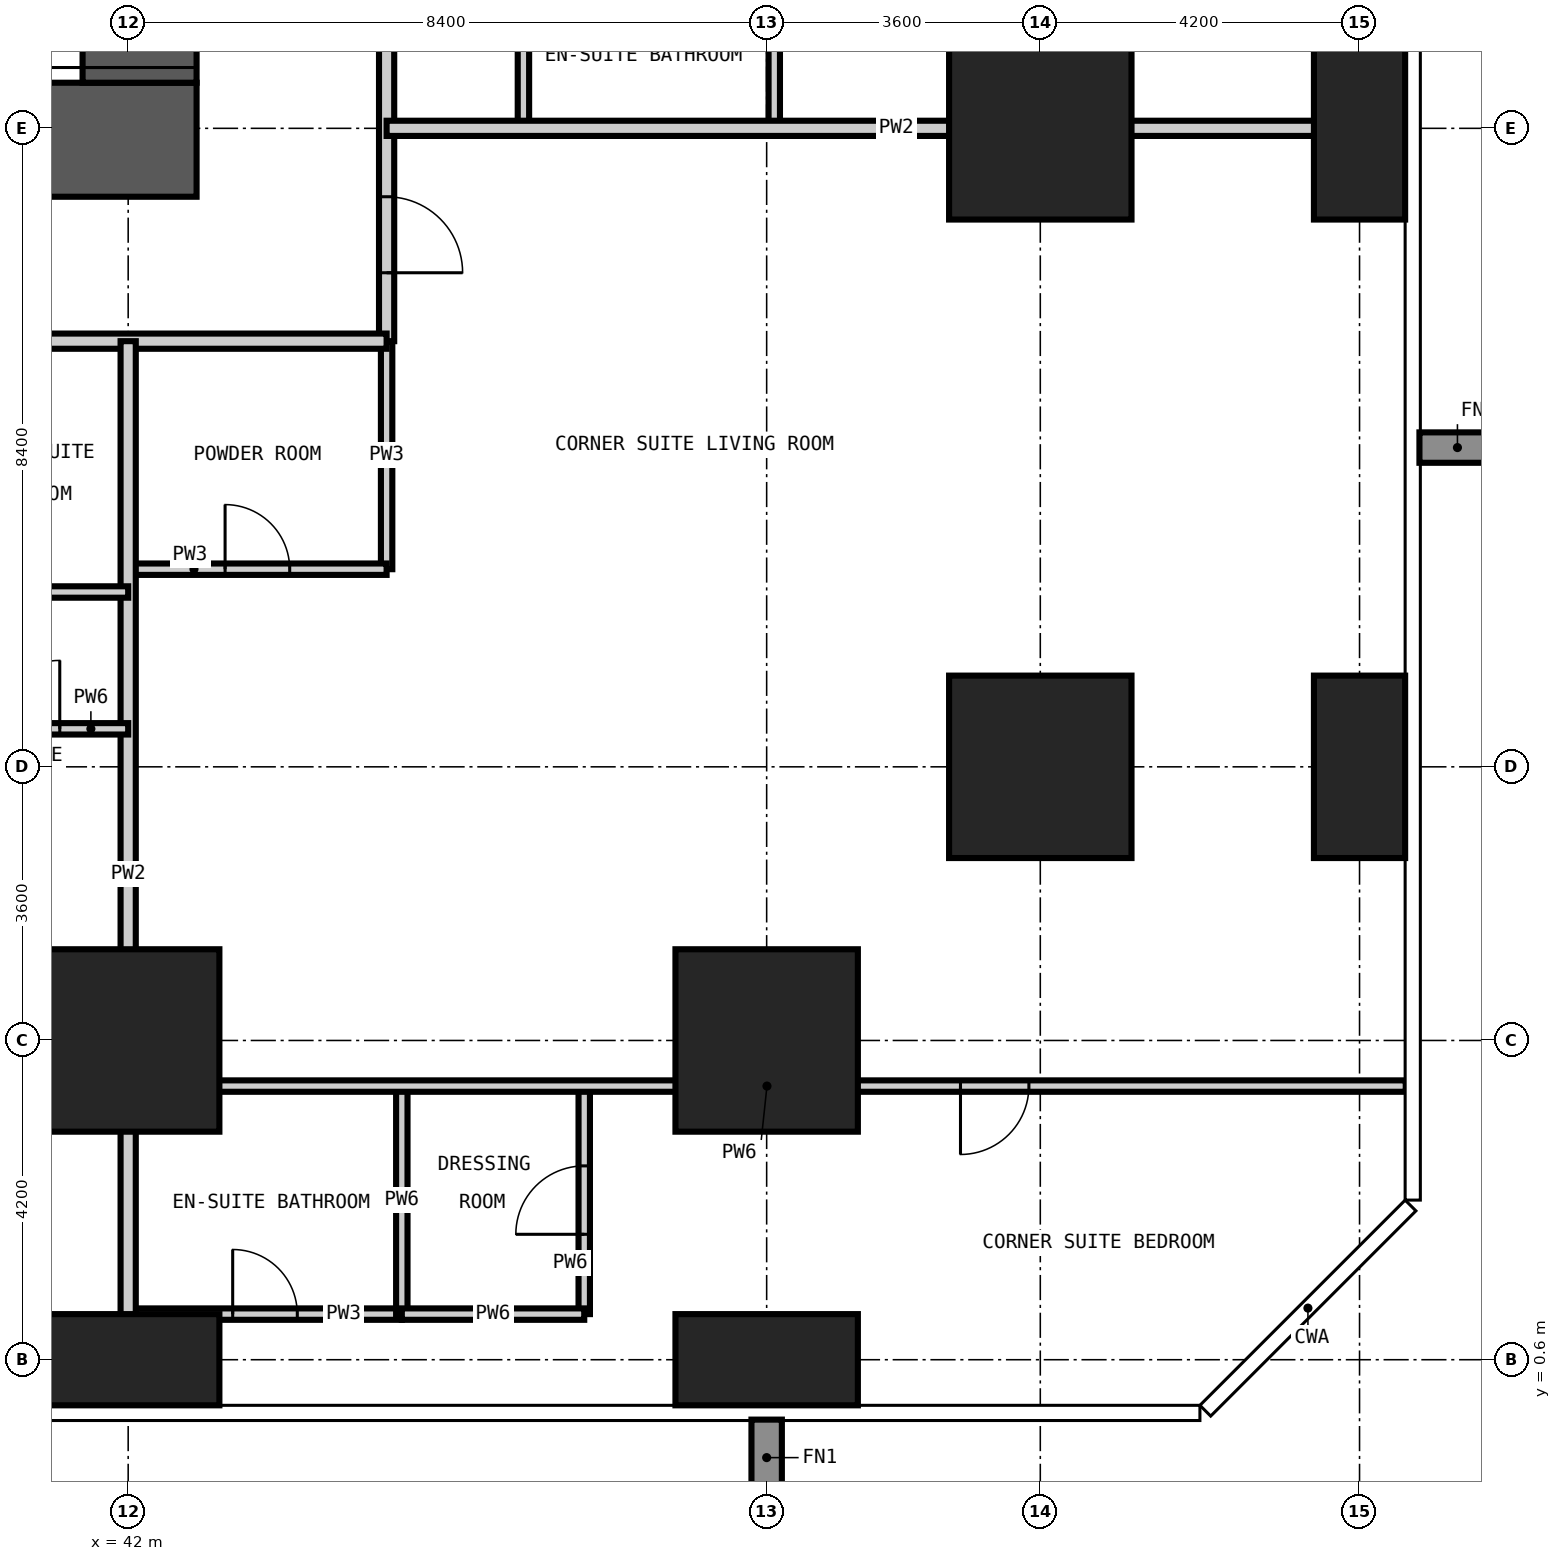
"""IFC4 building model, lengths in metres.
Left out: names, types, materials, properties, quantities, classifications, styles, units other than length and angle.
Written with IfcOpenShell. Run it as: python <this file> out.ifc"""

import sys

from ifc_helpers import new_model, si_unit, direction, frame, frame_2d, origin, origin_2d, place, context, subcontext, project, spatial, rectangle, extrude, element, fill, save


model = new_model("IFC4")
c1 = context("Model", 3, precision=1e-05, world=origin(), true_north=direction((0.0, 1.0)))
c2 = subcontext(c1, "Body", "Model", "MODEL_VIEW")
j1 = project(units=[si_unit("LENGTHUNIT", "METRE"), si_unit("PLANEANGLEUNIT", "RADIAN")], contexts=[c1])
p1 = place(None, origin())
s1 = spatial("IfcSite", under=j1, at=p1, CompositionType="ELEMENT")
p2 = place(p1, origin())
s2 = spatial("IfcBuilding", under=s1, at=p2, CompositionType="ELEMENT")
p3 = place(p2, frame((0.0, 0.0, 81.0)))
s3 = spatial("IfcBuildingStorey", under=s2, at=p3, CompositionType="ELEMENT", Elevation=81.0)
p4 = place(p3, frame((42.0, 0.6, -0.35), z_axis=(0.0, 0.0, 1.0), x_axis=(1.0, 0.0, 0.0)))
e1 = element("IfcColumn", 1, at=p4, inside=s3, PredefinedType="COLUMN", context=c2, shape_type="SweptSolid", body=[
    extrude(rectangle(XDim=2.4, YDim=1.2, at=origin_2d()), origin(), (0.0, 0.0, 1.0), 3.6),
])
p5 = place(p3, frame((42.0, 4.8, -0.35), z_axis=(0.0, 0.0, 1.0), x_axis=(1.0, 0.0, 0.0)))
e2 = element("IfcColumn", 2, at=p5, inside=s3, PredefinedType="COLUMN", context=c2, shape_type="SweptSolid", body=[
    extrude(rectangle(XDim=2.4, YDim=2.4, at=origin_2d()), origin(), (0.0, 0.0, 1.0), 3.6),
])
p6 = place(p3, frame((50.4, 0.6, -0.35), z_axis=(0.0, 0.0, 1.0), x_axis=(1.0, 0.0, 0.0)))
e3 = element("IfcColumn", 3, at=p6, inside=s3, PredefinedType="COLUMN", context=c2, shape_type="SweptSolid", body=[
    extrude(rectangle(XDim=2.4, YDim=1.2, at=origin_2d()), origin(), (0.0, 0.0, 1.0), 3.6),
])
for number, where, z_axis, x_axis in (
    (4, (50.4, 4.8, -0.35), (0.0, 0.0, 1.0), (1.0, 0.0, 0.0)),
    (5, (54.0, 8.4, -0.35), (0.0, 0.0, 1.0), (1.0, 0.0, 0.0)),
    (6, (54.0, 16.8, -0.35), (0.0, 0.0, 1.0), (1.0, 0.0, 0.0)),
):
    element("IfcColumn", number, at=place(p3, frame(where, z_axis=z_axis, x_axis=x_axis)), inside=s3, PredefinedType="COLUMN", context=c2, shape_type="SweptSolid", body=[
        extrude(rectangle(XDim=2.4, YDim=2.4, at=origin_2d()), origin(), (0.0, 0.0, 1.0), 3.6),
    ])
for number, where, z_axis, x_axis in (
    (7, (58.2, 8.4, -0.35), (0.0, 0.0, 1.0), (1.0, 0.0, 0.0)),
    (8, (58.2, 16.8, -0.35), (0.0, 0.0, 1.0), (1.0, 0.0, 0.0)),
):
    element("IfcColumn", number, at=place(p3, frame(where, z_axis=z_axis, x_axis=x_axis)), inside=s3, PredefinedType="COLUMN", context=c2, shape_type="SweptSolid", body=[
        extrude(rectangle(XDim=1.2, YDim=2.4, at=origin_2d()), origin(), (0.0, 0.0, 1.0), 3.6),
    ])
p7 = place(p3, frame((15.9, 16.65, -0.35), z_axis=(0.0, 0.0, 1.0), x_axis=(1.0, 0.0, 0.0)))
e9 = element("IfcWall", 9, at=p7, inside=s3, PredefinedType="SHEAR", context=c2, shape_type="SweptSolid", body=[
    extrude(rectangle(XDim=27.0, YDim=1.5, at=frame_2d((13.5, 0.0))), origin(), (0.0, 0.0, 1.0), 3.6),
])
p8 = place(p7, frame((13.0, 0.0, 0.35)))
e10 = element("IfcOpeningElement", 10, at=p8, cuts=e9, PredefinedType="OPENING", context=c2, shape_type="SweptSolid", body=[
    extrude(rectangle(XDim=1.0, YDim=2.1, at=frame_2d((0.5, 1.05))), frame((0.0, 0.76, 0.0), z_axis=(0.0, -1.0, 0.0), x_axis=(1.0, 0.0, 0.0)), (0.0, 0.0, 1.0), 1.52),
])
p9 = place(p7, frame((19.3, 0.0, 0.35)))
e11 = element("IfcOpeningElement", 11, at=p9, cuts=e9, PredefinedType="OPENING", context=c2, shape_type="SweptSolid", body=[
    extrude(rectangle(XDim=1.0, YDim=2.1, at=frame_2d((0.5, 1.05))), frame((0.0, 0.76, 0.0), z_axis=(0.0, -1.0, 0.0), x_axis=(1.0, 0.0, 0.0)), (0.0, 0.0, 1.0), 1.52),
])
p10 = place(p3, frame((42.15, 17.4, -0.35), z_axis=(0.0, 0.0, 1.0), x_axis=(0.0, 1.0, 0.0)))
e12 = element("IfcWall", 12, at=p10, inside=s3, PredefinedType="SHEAR", context=c2, shape_type="SweptSolid", body=[
    extrude(rectangle(XDim=24.0, YDim=1.5, at=frame_2d((12.0, 0.0))), origin(), (0.0, 0.0, 1.0), 3.6),
])
p11 = place(p10, frame((0.2, 0.0, 0.35)))
e13 = element("IfcOpeningElement", 13, at=p11, cuts=e12, PredefinedType="OPENING", context=c2, shape_type="SweptSolid", body=[
    extrude(rectangle(XDim=1.2, YDim=2.2, at=frame_2d((0.6, 1.1))), frame((0.0, 0.76, 0.0), z_axis=(0.0, -1.0, 0.0), x_axis=(1.0, 0.0, 0.0)), (0.0, 0.0, 1.0), 1.52),
])
p12 = place(p10, frame((11.5, 0.0, 0.35)))
e14 = element("IfcOpeningElement", 14, at=p12, cuts=e12, PredefinedType="OPENING", context=c2, shape_type="SweptSolid", body=[
    extrude(rectangle(XDim=1.0, YDim=2.1, at=frame_2d((0.5, 1.05))), frame((0.0, 0.76, 0.0), z_axis=(0.0, -1.0, 0.0), x_axis=(1.0, 0.0, 0.0)), (0.0, 0.0, 1.0), 1.52),
])
p13 = place(p10, frame((19.9, 0.0, 0.35)))
e15 = element("IfcOpeningElement", 15, at=p13, cuts=e12, PredefinedType="OPENING", context=c2, shape_type="SweptSolid", body=[
    extrude(rectangle(XDim=1.0, YDim=2.1, at=frame_2d((0.5, 1.05))), frame((0.0, 0.76, 0.0), z_axis=(0.0, -1.0, 0.0), x_axis=(1.0, 0.0, 0.0)), (0.0, 0.0, 1.0), 1.52),
])
for number, where, z_axis, x_axis in (
    (16, (45.4, 11.0, 0.0), (0.0, 0.0, 1.0), (0.0, 1.0, 0.0)),
    (17, (47.2, 16.8, 0.0), (0.0, 0.0, 1.0), (0.0, 1.0, 0.0)),
    (18, (50.5, 16.8, 0.0), (0.0, 0.0, 1.0), (0.0, 1.0, 0.0)),
):
    element("IfcWall", number, at=place(p3, frame(where, z_axis=z_axis, x_axis=x_axis)), inside=s3, PredefinedType="PARTITIONING", context=c2, shape_type="SweptSolid", body=[
        extrude(rectangle(XDim=3.0, YDim=0.15, at=frame_2d((1.5, 0.0))), origin(), (0.0, 0.0, 1.0), 3.25),
    ])
p14 = place(p3, frame((42.0, 1.2, 0.0), z_axis=(0.0, 0.0, 1.0), x_axis=(1.0, 0.0, 0.0)))
e19 = element("IfcWall", 19, at=p14, inside=s3, PredefinedType="PARTITIONING", context=c2, shape_type="SweptSolid", body=[
    extrude(rectangle(XDim=3.6, YDim=0.15, at=frame_2d((1.8, 0.0))), origin(), (0.0, 0.0, 1.0), 3.25),
])
p15 = place(p14, frame((1.375, 0.0, 0.0)))
e20 = element("IfcOpeningElement", 20, at=p15, cuts=e19, PredefinedType="OPENING", context=c2, shape_type="SweptSolid", body=[
    extrude(rectangle(XDim=0.85, YDim=2.1, at=frame_2d((0.425, 1.05))), frame((0.0, 0.085, 0.0), z_axis=(0.0, -1.0, 0.0), x_axis=(1.0, 0.0, 0.0)), (0.0, 0.0, 1.0), 0.17),
])
p16 = place(p3, frame((42.0, 11.0, 0.0), z_axis=(0.0, 0.0, 1.0), x_axis=(1.0, 0.0, 0.0)))
e21 = element("IfcWall", 21, at=p16, inside=s3, PredefinedType="PARTITIONING", context=c2, shape_type="SweptSolid", body=[
    extrude(rectangle(XDim=3.4, YDim=0.15, at=frame_2d((1.7, 0.0))), origin(), (0.0, 0.0, 1.0), 3.25),
])
p17 = place(p16, frame((1.275, 0.0, 0.0)))
e22 = element("IfcOpeningElement", 22, at=p17, cuts=e21, PredefinedType="OPENING", context=c2, shape_type="SweptSolid", body=[
    extrude(rectangle(XDim=0.85, YDim=2.1, at=frame_2d((0.425, 1.05))), frame((0.0, 0.085, 0.0), z_axis=(0.0, -1.0, 0.0), x_axis=(1.0, 0.0, 0.0)), (0.0, 0.0, 1.0), 0.17),
])
p18 = place(p3, frame((45.4, 46.0, 0.0), z_axis=(0.0, 0.0, 1.0), x_axis=(0.0, -1.0, 0.0)))
e23 = element("IfcWall", 23, at=p18, inside=s3, PredefinedType="PARTITIONING", context=c2, shape_type="SweptSolid", body=[
    extrude(rectangle(XDim=32.0, YDim=0.2, at=frame_2d((16.0, 0.0))), origin(), (0.0, 0.0, 1.0), 3.25),
])
p19 = place(p18, frame((22.4, 0.0, 0.0)))
e24 = element("IfcOpeningElement", 24, at=p19, cuts=e23, PredefinedType="OPENING", context=c2, shape_type="SweptSolid", body=[
    extrude(rectangle(XDim=1.0, YDim=2.2, at=frame_2d((0.5, 1.1))), frame((0.0, 0.11, 0.0), z_axis=(0.0, -1.0, 0.0), x_axis=(1.0, 0.0, 0.0)), (0.0, 0.0, 1.0), 0.22),
])
p20 = place(p18, frame((9.8, 0.0, 0.0)))
e25 = element("IfcOpeningElement", 25, at=p20, cuts=e23, PredefinedType="OPENING", context=c2, shape_type="SweptSolid", body=[
    extrude(rectangle(XDim=1.0, YDim=2.2, at=frame_2d((0.5, 1.1))), frame((0.0, 0.11, 0.0), z_axis=(0.0, -1.0, 0.0), x_axis=(1.0, 0.0, 0.0)), (0.0, 0.0, 1.0), 0.22),
])
p21 = place(p18, frame((30.1, 0.0, 0.0)))
e26 = element("IfcOpeningElement", 26, at=p21, cuts=e23, PredefinedType="OPENING", context=c2, shape_type="SweptSolid", body=[
    extrude(rectangle(XDim=1.0, YDim=2.2, at=frame_2d((0.5, 1.1))), frame((0.0, 0.11, 0.0), z_axis=(0.0, -1.0, 0.0), x_axis=(1.0, 0.0, 0.0)), (0.0, 0.0, 1.0), 0.22),
])
p22 = place(p18, frame((1.5, 0.0, 0.0)))
e27 = element("IfcOpeningElement", 27, at=p22, cuts=e23, PredefinedType="OPENING", context=c2, shape_type="SweptSolid", body=[
    extrude(rectangle(XDim=1.0, YDim=2.2, at=frame_2d((0.5, 1.1))), frame((0.0, 0.11, 0.0), z_axis=(0.0, -1.0, 0.0), x_axis=(1.0, 0.0, 0.0)), (0.0, 0.0, 1.0), 0.22),
])
p23 = place(p3, frame((45.4, 14.0, 0.0), z_axis=(0.0, 0.0, 1.0), x_axis=(-1.0, 0.0, 0.0)))
e28 = element("IfcWall", 28, at=p23, inside=s3, PredefinedType="PARTITIONING", context=c2, shape_type="SweptSolid", body=[
    extrude(rectangle(XDim=31.4, YDim=0.2, at=frame_2d((15.7, 0.0))), origin(), (0.0, 0.0, 1.0), 3.25),
])
p24 = place(p23, frame((24.65, 0.0, 0.0)))
e29 = element("IfcOpeningElement", 29, at=p24, cuts=e28, PredefinedType="OPENING", context=c2, shape_type="SweptSolid", body=[
    extrude(rectangle(XDim=1.0, YDim=2.2, at=frame_2d((0.5, 1.1))), frame((0.0, 0.11, 0.0), z_axis=(0.0, -1.0, 0.0), x_axis=(1.0, 0.0, 0.0)), (0.0, 0.0, 1.0), 0.22),
])
p25 = place(p23, frame((23.15, 0.0, 0.0)))
e30 = element("IfcOpeningElement", 30, at=p25, cuts=e28, PredefinedType="OPENING", context=c2, shape_type="SweptSolid", body=[
    extrude(rectangle(XDim=1.0, YDim=2.2, at=frame_2d((0.5, 1.1))), frame((0.0, 0.11, 0.0), z_axis=(0.0, -1.0, 0.0), x_axis=(1.0, 0.0, 0.0)), (0.0, 0.0, 1.0), 0.22),
])
p26 = place(p23, frame((13.4, 0.0, 0.0)))
e31 = element("IfcOpeningElement", 31, at=p26, cuts=e28, PredefinedType="OPENING", context=c2, shape_type="SweptSolid", body=[
    extrude(rectangle(XDim=1.0, YDim=2.2, at=frame_2d((0.5, 1.1))), frame((0.0, 0.11, 0.0), z_axis=(0.0, -1.0, 0.0), x_axis=(1.0, 0.0, 0.0)), (0.0, 0.0, 1.0), 0.22),
])
p27 = place(p23, frame((6.35, 0.0, 0.0)))
e32 = element("IfcOpeningElement", 32, at=p27, cuts=e28, PredefinedType="OPENING", context=c2, shape_type="SweptSolid", body=[
    extrude(rectangle(XDim=1.0, YDim=2.2, at=frame_2d((0.5, 1.1))), frame((0.0, 0.11, 0.0), z_axis=(0.0, -1.0, 0.0), x_axis=(1.0, 0.0, 0.0)), (0.0, 0.0, 1.0), 0.22),
])
p28 = place(p3, frame((42.0, -0.008, 0.0), z_axis=(0.0, 0.0, 1.0), x_axis=(0.0, 1.0, 0.0)))
e33 = element("IfcWall", 33, at=p28, inside=s3, PredefinedType="PARTITIONING", context=c2, shape_type="SweptSolid", body=[
    extrude(rectangle(XDim=14.008, YDim=0.2, at=frame_2d((7.004, 0.0))), origin(), (0.0, 0.0, 1.0), 3.25),
])
p29 = place(p3, frame((45.4, 16.8, 0.0), z_axis=(0.0, 0.0, 1.0), x_axis=(1.0, 0.0, 0.0)))
e34 = element("IfcWall", 34, at=p29, inside=s3, PredefinedType="PARTITIONING", context=c2, shape_type="SweptSolid", body=[
    extrude(rectangle(XDim=13.408, YDim=0.2, at=frame_2d((6.704, 0.0))), origin(), (0.0, 0.0, 1.0), 3.25),
])
p30 = place(p3, frame((45.6, 1.2, 0.0), z_axis=(0.0, 0.0, 1.0), x_axis=(0.0, 1.0, 0.0)))
e35 = element("IfcWall", 35, at=p30, inside=s3, PredefinedType="PARTITIONING", context=c2, shape_type="SweptSolid", body=[
    extrude(rectangle(XDim=3.0, YDim=0.15, at=frame_2d((1.5, 0.0))), origin(), (0.0, 0.0, 1.0), 3.25),
])
p31 = place(p3, frame((48.0, 1.2, 0.0), z_axis=(0.0, 0.0, 1.0), x_axis=(0.0, 1.0, 0.0)))
e36 = element("IfcWall", 36, at=p31, inside=s3, PredefinedType="PARTITIONING", context=c2, shape_type="SweptSolid", body=[
    extrude(rectangle(XDim=3.0, YDim=0.15, at=frame_2d((1.5, 0.0))), origin(), (0.0, 0.0, 1.0), 3.25),
])
p32 = place(p31, frame((1.05, 0.0, 0.0)))
e37 = element("IfcOpeningElement", 37, at=p32, cuts=e36, PredefinedType="OPENING", context=c2, shape_type="SweptSolid", body=[
    extrude(rectangle(XDim=0.9, YDim=2.1, at=frame_2d((0.45, 1.05))), frame((0.0, 0.085, 0.0), z_axis=(0.0, -1.0, 0.0), x_axis=(1.0, 0.0, 0.0)), (0.0, 0.0, 1.0), 0.17),
])
p33 = place(p3, frame((45.6, 1.2, 0.0), z_axis=(0.0, 0.0, 1.0), x_axis=(1.0, 0.0, 0.0)))
e38 = element("IfcWall", 38, at=p33, inside=s3, PredefinedType="PARTITIONING", context=c2, shape_type="SweptSolid", body=[
    extrude(rectangle(XDim=2.4, YDim=0.15, at=frame_2d((1.2, 0.0))), origin(), (0.0, 0.0, 1.0), 3.25),
])
p34 = place(p3, frame((42.0, 4.2, 0.0), z_axis=(0.0, 0.0, 1.0), x_axis=(1.0, 0.0, 0.0)))
e39 = element("IfcWall", 39, at=p34, inside=s3, PredefinedType="PARTITIONING", context=c2, shape_type="SweptSolid", body=[
    extrude(rectangle(XDim=16.808, YDim=0.15, at=frame_2d((8.404, 0.0))), origin(), (0.0, 0.0, 1.0), 3.25),
])
p35 = place(p34, frame((10.95, 0.0, 0.0)))
e40 = element("IfcOpeningElement", 40, at=p35, cuts=e39, PredefinedType="OPENING", context=c2, shape_type="SweptSolid", body=[
    extrude(rectangle(XDim=0.9, YDim=2.1, at=frame_2d((0.45, 1.05))), frame((0.0, 0.085, 0.0), z_axis=(0.0, -1.0, 0.0), x_axis=(1.0, 0.0, 0.0)), (0.0, 0.0, 1.0), 0.17),
])
p36 = place(p3, frame((39.3, 8.9, 0.0), z_axis=(0.0, 0.0, 1.0), x_axis=(1.0, 0.0, 0.0)))
e41 = element("IfcWall", 41, at=p36, inside=s3, PredefinedType="PARTITIONING", context=c2, shape_type="SweptSolid", body=[
    extrude(rectangle(XDim=2.7, YDim=0.15, at=frame_2d((1.35, 0.0))), origin(), (0.0, 0.0, 1.0), 3.25),
])
p37 = place(p36, frame((0.9, 0.0, 0.0)))
e42 = element("IfcOpeningElement", 42, at=p37, cuts=e41, PredefinedType="OPENING", context=c2, shape_type="SweptSolid", body=[
    extrude(rectangle(XDim=0.9, YDim=2.1, at=frame_2d((0.45, 1.05))), frame((0.0, 0.085, 0.0), z_axis=(0.0, -1.0, 0.0), x_axis=(1.0, 0.0, 0.0)), (0.0, 0.0, 1.0), 0.17),
])
p38 = place(p3, frame((39.3, 10.7, 0.0), z_axis=(0.0, 0.0, 1.0), x_axis=(1.0, 0.0, 0.0)))
e43 = element("IfcWall", 43, at=p38, inside=s3, PredefinedType="PARTITIONING", context=c2, shape_type="SweptSolid", body=[
    extrude(rectangle(XDim=2.7, YDim=0.15, at=frame_2d((1.35, 0.0))), origin(), (0.0, 0.0, 1.0), 3.25),
])
p39 = place(p11, origin())
e44 = element("IfcDoor", 44, at=p39, inside=s3, OperationType="SINGLE_SWING_LEFT", PredefinedType="DOOR", context=c2, shape_type="SweptSolid", body=[
    extrude(rectangle(XDim=1.2, YDim=2.2, at=frame_2d((0.6, 1.1))), frame((0.0, 0.025, 0.0), z_axis=(0.0, -1.0, 0.0), x_axis=(1.0, 0.0, 0.0)), (0.0, 0.0, 1.0), 0.05),
])
fill(e13, e44)
p40 = place(p37, origin())
e45 = element("IfcDoor", 45, at=p40, inside=s3, OperationType="SINGLE_SWING_RIGHT", PredefinedType="DOOR", context=c2, shape_type="SweptSolid", body=[
    extrude(rectangle(XDim=0.9, YDim=2.1, at=frame_2d((0.45, 1.05))), frame((0.0, 0.025, 0.0), z_axis=(0.0, -1.0, 0.0), x_axis=(1.0, 0.0, 0.0)), (0.0, 0.0, 1.0), 0.05),
])
fill(e42, e45)
p41 = place(p21, origin())
e46 = element("IfcDoor", 46, at=p41, inside=s3, OperationType="SINGLE_SWING_RIGHT", PredefinedType="DOOR", context=c2, shape_type="SweptSolid", body=[
    extrude(rectangle(XDim=1.0, YDim=2.2, at=frame_2d((0.5, 1.1))), frame((0.0, 0.025, 0.0), z_axis=(0.0, -1.0, 0.0), x_axis=(1.0, 0.0, 0.0)), (0.0, 0.0, 1.0), 0.05),
])
fill(e26, e46)
p42 = place(p17, origin())
e47 = element("IfcDoor", 47, at=p42, inside=s3, OperationType="SINGLE_SWING_LEFT", PredefinedType="DOOR", context=c2, shape_type="SweptSolid", body=[
    extrude(rectangle(XDim=0.85, YDim=2.1, at=frame_2d((0.425, 1.05))), frame((0.0, 0.025, 0.0), z_axis=(0.0, -1.0, 0.0), x_axis=(1.0, 0.0, 0.0)), (0.0, 0.0, 1.0), 0.05),
])
fill(e22, e47)
p43 = place(p35, frame((0.9, 0.0, 0.0), z_axis=(0.0, 0.0, 1.0), x_axis=(-1.0, 0.0, 0.0)))
e48 = element("IfcDoor", 48, at=p43, inside=s3, OperationType="SINGLE_SWING_RIGHT", PredefinedType="DOOR", context=c2, shape_type="SweptSolid", body=[
    extrude(rectangle(XDim=0.9, YDim=2.1, at=frame_2d((0.45, 1.05))), frame((0.0, 0.025, 0.0), z_axis=(0.0, -1.0, 0.0), x_axis=(1.0, 0.0, 0.0)), (0.0, 0.0, 1.0), 0.05),
])
fill(e40, e48)
p44 = place(p15, origin())
e49 = element("IfcDoor", 49, at=p44, inside=s3, OperationType="SINGLE_SWING_LEFT", PredefinedType="DOOR", context=c2, shape_type="SweptSolid", body=[
    extrude(rectangle(XDim=0.85, YDim=2.1, at=frame_2d((0.425, 1.05))), frame((0.0, 0.025, 0.0), z_axis=(0.0, -1.0, 0.0), x_axis=(1.0, 0.0, 0.0)), (0.0, 0.0, 1.0), 0.05),
])
fill(e20, e49)
p45 = place(p32, origin())
e50 = element("IfcDoor", 50, at=p45, inside=s3, OperationType="SINGLE_SWING_LEFT", PredefinedType="DOOR", context=c2, shape_type="SweptSolid", body=[
    extrude(rectangle(XDim=0.9, YDim=2.1, at=frame_2d((0.45, 1.05))), frame((0.0, 0.025, 0.0), z_axis=(0.0, -1.0, 0.0), x_axis=(1.0, 0.0, 0.0)), (0.0, 0.0, 1.0), 0.05),
])
fill(e37, e50)
save(model, sys.argv[1])
